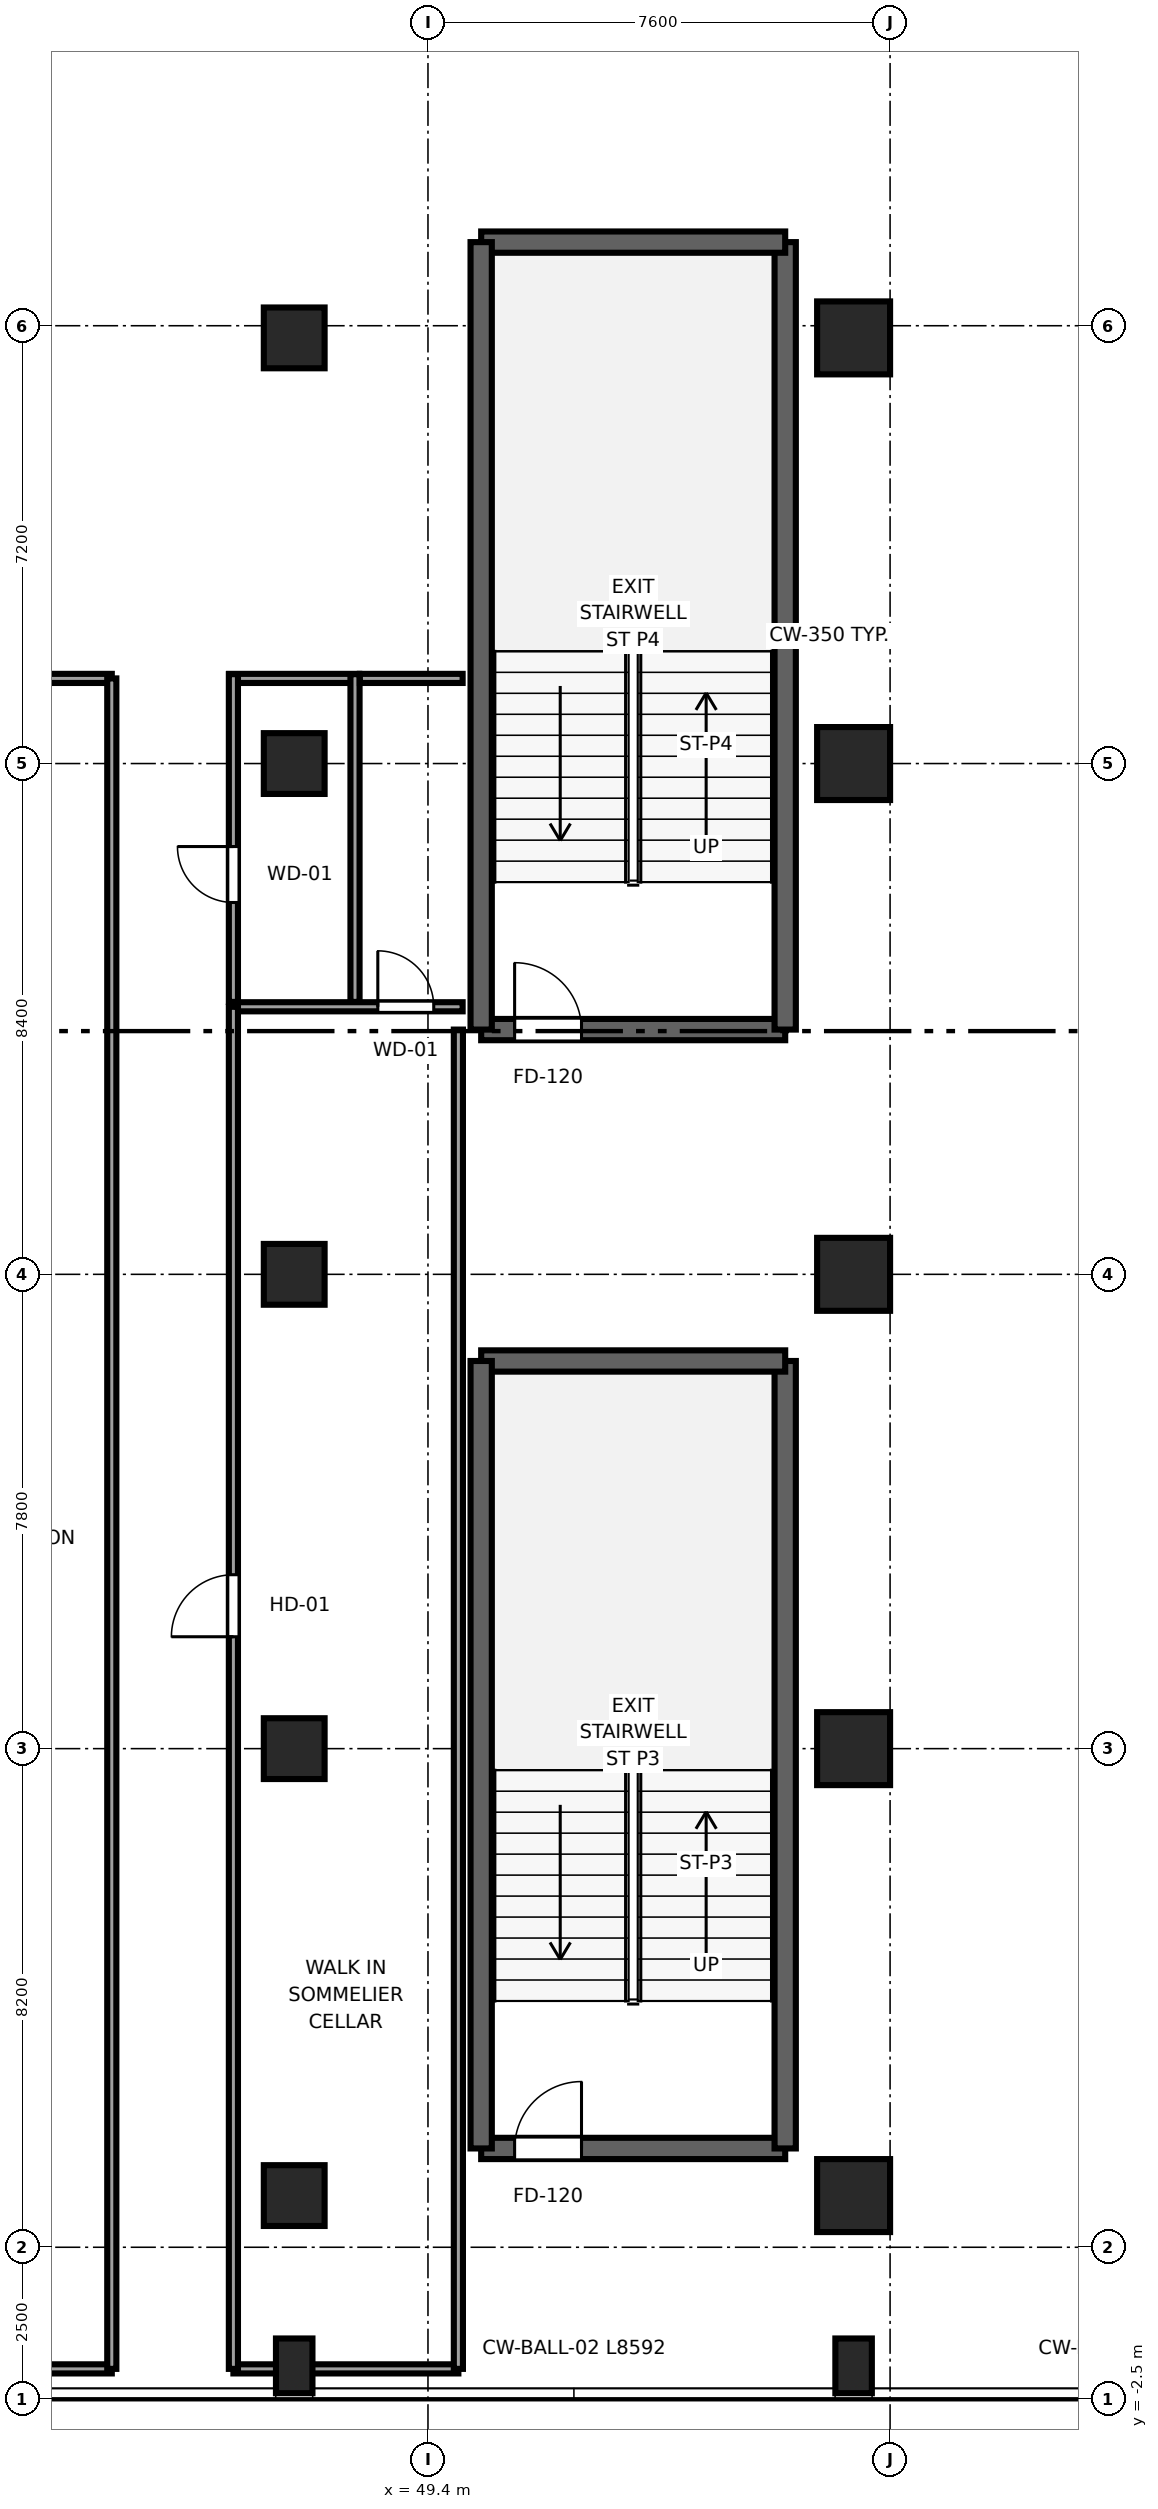
"""IFC4 building model, lengths in metres.
Left out: names, types, materials, properties, quantities, classifications, styles, units other than length and angle.
Written with IfcOpenShell. Run it as: python <this file> out.ifc"""

import sys

from ifc_helpers import new_model, si_unit, direction, frame, frame_2d, origin, origin_2d, place, context, subcontext, project, spatial, rectangle, extrude, source, transform, mapped, element, fill, save


model = new_model("IFC4")
c1 = context("Model", 3, precision=1e-05, world=origin(), true_north=direction((0.0, 1.0)))
c2 = subcontext(c1, "Body", "Model", "MODEL_VIEW")
j1 = project(units=[si_unit("LENGTHUNIT", "METRE"), si_unit("PLANEANGLEUNIT", "RADIAN")], contexts=[c1])
p1 = place(None, origin())
s1 = spatial("IfcSite", under=j1, at=p1, CompositionType="ELEMENT")
p2 = place(p1, origin())
s2 = spatial("IfcBuilding", under=s1, at=p2, CompositionType="ELEMENT")
p3 = place(p2, frame((0.0, 0.0, 22.4)))
s3 = spatial("IfcBuildingStorey", under=s2, at=p3, CompositionType="ELEMENT", Elevation=22.4)
p4 = place(p3, frame((50.275, 1.625, 0.0), z_axis=(0.0, 0.0, 1.0), x_axis=(1.0, 0.0, 0.0)))
e1 = element("IfcWall", 1, at=p4, inside=s3, PredefinedType="SHEAR", context=c2, shape_type="SweptSolid", body=[
    extrude(rectangle(XDim=5.0, YDim=0.35, at=frame_2d((2.5, 0.0))), origin(), (0.0, 0.0, 1.0), 4.4),
])
p5 = place(p4, frame((0.55, 0.0, 0.0)))
e2 = element("IfcOpeningElement", 2, at=p5, cuts=e1, PredefinedType="OPENING", context=c2, shape_type="SweptSolid", body=[
    extrude(rectangle(XDim=1.1, YDim=2.12, at=frame_2d((0.55, 1.06))), frame((0.0, 0.185, 0.0), z_axis=(0.0, -1.0, 0.0), x_axis=(1.0, 0.0, 0.0)), (0.0, 0.0, 1.0), 0.37),
])
p6 = place(p3, frame((55.275, 1.625, 0.0), z_axis=(0.0, 0.0, 1.0), x_axis=(0.0, 1.0, 0.0)))
e3 = element("IfcWall", 3, at=p6, inside=s3, PredefinedType="SHEAR", context=c2, shape_type="SweptSolid", body=[
    extrude(rectangle(XDim=12.95, YDim=0.35, at=frame_2d((6.475, 0.0))), origin(), (0.0, 0.0, 1.0), 4.4),
])
p7 = place(p3, frame((55.275, 14.575, 0.0), z_axis=(0.0, 0.0, 1.0), x_axis=(-1.0, 0.0, 0.0)))
e4 = element("IfcWall", 4, at=p7, inside=s3, PredefinedType="SHEAR", context=c2, shape_type="SweptSolid", body=[
    extrude(rectangle(XDim=5.0, YDim=0.35, at=frame_2d((2.5, 0.0))), origin(), (0.0, 0.0, 1.0), 4.4),
])
p8 = place(p3, frame((50.275, 14.575, 0.0), z_axis=(0.0, 0.0, 1.0), x_axis=(0.0, -1.0, 0.0)))
e5 = element("IfcWall", 5, at=p8, inside=s3, PredefinedType="SHEAR", context=c2, shape_type="SweptSolid", body=[
    extrude(rectangle(XDim=12.95, YDim=0.35, at=frame_2d((6.475, 0.0))), origin(), (0.0, 0.0, 1.0), 4.4),
])
p9 = place(p3, frame((50.275, 20.025, 0.0), z_axis=(0.0, 0.0, 1.0), x_axis=(1.0, 0.0, 0.0)))
e6 = element("IfcWall", 6, at=p9, inside=s3, PredefinedType="SHEAR", context=c2, shape_type="SweptSolid", body=[
    extrude(rectangle(XDim=5.0, YDim=0.35, at=frame_2d((2.5, 0.0))), origin(), (0.0, 0.0, 1.0), 4.4),
])
p10 = place(p9, frame((0.55, 0.0, 0.0)))
e7 = element("IfcOpeningElement", 7, at=p10, cuts=e6, PredefinedType="OPENING", context=c2, shape_type="SweptSolid", body=[
    extrude(rectangle(XDim=1.1, YDim=2.12, at=frame_2d((0.55, 1.06))), frame((0.0, 0.185, 0.0), z_axis=(0.0, -1.0, 0.0), x_axis=(1.0, 0.0, 0.0)), (0.0, 0.0, 1.0), 0.37),
])
p11 = place(p3, frame((55.275, 20.025, 0.0), z_axis=(0.0, 0.0, 1.0), x_axis=(0.0, 1.0, 0.0)))
e8 = element("IfcWall", 8, at=p11, inside=s3, PredefinedType="SHEAR", context=c2, shape_type="SweptSolid", body=[
    extrude(rectangle(XDim=12.95, YDim=0.35, at=frame_2d((6.475, 0.0))), origin(), (0.0, 0.0, 1.0), 4.4),
])
p12 = place(p3, frame((55.275, 32.975, 0.0), z_axis=(0.0, 0.0, 1.0), x_axis=(-1.0, 0.0, 0.0)))
e9 = element("IfcWall", 9, at=p12, inside=s3, PredefinedType="SHEAR", context=c2, shape_type="SweptSolid", body=[
    extrude(rectangle(XDim=5.0, YDim=0.35, at=frame_2d((2.5, 0.0))), origin(), (0.0, 0.0, 1.0), 4.4),
])
p13 = place(p3, frame((50.275, 32.975, 0.0), z_axis=(0.0, 0.0, 1.0), x_axis=(0.0, -1.0, 0.0)))
e10 = element("IfcWall", 10, at=p13, inside=s3, PredefinedType="SHEAR", context=c2, shape_type="SweptSolid", body=[
    extrude(rectangle(XDim=12.95, YDim=0.35, at=frame_2d((6.475, 0.0))), origin(), (0.0, 0.0, 1.0), 4.4),
])
m1 = source(origin(), c2, "Body", "SweptSolid", [
    extrude(rectangle(XDim=1.0, YDim=1.0, at=origin_2d()), origin(), (0.0, 0.0, 1.0), 4.4),
])
p14 = place(p3, frame((47.2, 0.85, 0.0), z_axis=(0.0, 0.0, 1.0), x_axis=(1.0, 0.0, 0.0)))
e11 = element("IfcColumn", 11, at=p14, inside=s3, PredefinedType="COLUMN", context=c2, shape_type="MappedRepresentation", body=[
    mapped(m1, transform((0.0, 0.0, 0.0), x_axis=(1.0, 0.0, 0.0), y_axis=(0.0, 1.0, 0.0), z_axis=(0.0, 0.0, 1.0), scale=1.0)),
])
m2 = source(origin(), c2, "Body", "SweptSolid", [
    extrude(rectangle(XDim=1.2, YDim=1.2, at=origin_2d()), origin(), (0.0, 0.0, 1.0), 4.4),
])
p15 = place(p3, frame((56.4, 0.85, 0.0), z_axis=(0.0, 0.0, 1.0), x_axis=(1.0, 0.0, 0.0)))
e12 = element("IfcColumn", 12, at=p15, inside=s3, PredefinedType="COLUMN", context=c2, shape_type="MappedRepresentation", body=[
    mapped(m2, transform((0.0, 0.0, 0.0), x_axis=(1.0, 0.0, 0.0), y_axis=(0.0, 1.0, 0.0), z_axis=(0.0, 0.0, 1.0), scale=1.0)),
])
p16 = place(p3, frame((47.2, 8.2, 0.0), z_axis=(0.0, 0.0, 1.0), x_axis=(1.0, 0.0, 0.0)))
e13 = element("IfcColumn", 13, at=p16, inside=s3, PredefinedType="COLUMN", context=c2, shape_type="MappedRepresentation", body=[
    mapped(m1, transform((0.0, 0.0, 0.0), x_axis=(1.0, 0.0, 0.0), y_axis=(0.0, 1.0, 0.0), z_axis=(0.0, 0.0, 1.0), scale=1.0)),
])
p17 = place(p3, frame((56.4, 8.2, 0.0), z_axis=(0.0, 0.0, 1.0), x_axis=(1.0, 0.0, 0.0)))
e14 = element("IfcColumn", 14, at=p17, inside=s3, PredefinedType="COLUMN", context=c2, shape_type="MappedRepresentation", body=[
    mapped(m2, transform((0.0, 0.0, 0.0), x_axis=(1.0, 0.0, 0.0), y_axis=(0.0, 1.0, 0.0), z_axis=(0.0, 0.0, 1.0), scale=1.0)),
])
p18 = place(p3, frame((47.2, 16.0, 0.0), z_axis=(0.0, 0.0, 1.0), x_axis=(1.0, 0.0, 0.0)))
e15 = element("IfcColumn", 15, at=p18, inside=s3, PredefinedType="COLUMN", context=c2, shape_type="MappedRepresentation", body=[
    mapped(m1, transform((0.0, 0.0, 0.0), x_axis=(1.0, 0.0, 0.0), y_axis=(0.0, 1.0, 0.0), z_axis=(0.0, 0.0, 1.0), scale=1.0)),
])
p19 = place(p3, frame((56.4, 16.0, 0.0), z_axis=(0.0, 0.0, 1.0), x_axis=(1.0, 0.0, 0.0)))
e16 = element("IfcColumn", 16, at=p19, inside=s3, PredefinedType="COLUMN", context=c2, shape_type="MappedRepresentation", body=[
    mapped(m2, transform((0.0, 0.0, 0.0), x_axis=(1.0, 0.0, 0.0), y_axis=(0.0, 1.0, 0.0), z_axis=(0.0, 0.0, 1.0), scale=1.0)),
])
p20 = place(p3, frame((47.2, 24.4, 0.0), z_axis=(0.0, 0.0, 1.0), x_axis=(1.0, 0.0, 0.0)))
e17 = element("IfcColumn", 17, at=p20, inside=s3, PredefinedType="COLUMN", context=c2, shape_type="MappedRepresentation", body=[
    mapped(m1, transform((0.0, 0.0, 0.0), x_axis=(1.0, 0.0, 0.0), y_axis=(0.0, 1.0, 0.0), z_axis=(0.0, 0.0, 1.0), scale=1.0)),
])
p21 = place(p3, frame((56.4, 24.4, 0.0), z_axis=(0.0, 0.0, 1.0), x_axis=(1.0, 0.0, 0.0)))
e18 = element("IfcColumn", 18, at=p21, inside=s3, PredefinedType="COLUMN", context=c2, shape_type="MappedRepresentation", body=[
    mapped(m2, transform((0.0, 0.0, 0.0), x_axis=(1.0, 0.0, 0.0), y_axis=(0.0, 1.0, 0.0), z_axis=(0.0, 0.0, 1.0), scale=1.0)),
])
p22 = place(p3, frame((47.2, 31.4, 0.0), z_axis=(0.0, 0.0, 1.0), x_axis=(1.0, 0.0, 0.0)))
e19 = element("IfcColumn", 19, at=p22, inside=s3, PredefinedType="COLUMN", context=c2, shape_type="MappedRepresentation", body=[
    mapped(m1, transform((0.0, 0.0, 0.0), x_axis=(1.0, 0.0, 0.0), y_axis=(0.0, 1.0, 0.0), z_axis=(0.0, 0.0, 1.0), scale=1.0)),
])
p23 = place(p3, frame((56.4, 31.4, 0.0), z_axis=(0.0, 0.0, 1.0), x_axis=(1.0, 0.0, 0.0)))
e20 = element("IfcColumn", 20, at=p23, inside=s3, PredefinedType="COLUMN", context=c2, shape_type="MappedRepresentation", body=[
    mapped(m2, transform((0.0, 0.0, 0.0), x_axis=(1.0, 0.0, 0.0), y_axis=(0.0, 1.0, 0.0), z_axis=(0.0, 0.0, 1.0), scale=1.0)),
])
m3 = source(origin(), c2, "Body", "SweptSolid", [
    extrude(rectangle(XDim=0.6, YDim=0.9, at=origin_2d()), origin(), (0.0, 0.0, 1.0), 4.4),
])
for number, where, z_axis, x_axis in (
    (21, (47.2, -1.95, 0.0), (0.0, 0.0, 1.0), (1.0, 0.0, 0.0)),
    (22, (56.4, -1.95, 0.0), (0.0, 0.0, 1.0), (1.0, 0.0, 0.0)),
):
    element("IfcColumn", number, at=place(p3, frame(where, z_axis=z_axis, x_axis=x_axis)), inside=s3, PredefinedType="PILASTER", context=c2, shape_type="MappedRepresentation", body=[
        mapped(m3, transform((0.0, 0.0, 0.0), x_axis=(1.0, 0.0, 0.0), y_axis=(0.0, 1.0, 0.0), z_axis=(0.0, 0.0, 1.0), scale=1.0)),
    ])
p24 = place(p3, frame((39.1, -2.0, 0.0), z_axis=(0.0, 0.0, 1.0), x_axis=(1.0, 0.0, 0.0)))
e23 = element("IfcWall", 23, at=p24, inside=s3, PredefinedType="PARTITIONING", context=c2, shape_type="SweptSolid", body=[
    extrude(rectangle(XDim=5.1, YDim=0.15, at=frame_2d((2.55, 0.0))), origin(), (0.0, 0.0, 1.0), 3.43),
])
p25 = place(p3, frame((39.1, 25.8, 0.0), z_axis=(0.0, 0.0, 1.0), x_axis=(1.0, 0.0, 0.0)))
e24 = element("IfcWall", 24, at=p25, inside=s3, PredefinedType="PARTITIONING", context=c2, shape_type="SweptSolid", body=[
    extrude(rectangle(XDim=5.1, YDim=0.15, at=frame_2d((2.55, 0.0))), origin(), (0.0, 0.0, 1.0), 4.14),
])
p26 = place(p25, frame((1.725, 0.0, 0.0)))
e25 = element("IfcOpeningElement", 25, at=p26, cuts=e24, PredefinedType="OPENING", context=c2, shape_type="SweptSolid", body=[
    extrude(rectangle(XDim=1.65, YDim=2.15, at=frame_2d((0.825, 1.075))), frame((0.0, 0.085, 0.0), z_axis=(0.0, -1.0, 0.0), x_axis=(1.0, 0.0, 0.0)), (0.0, 0.0, 1.0), 0.17),
])
p27 = place(p3, frame((44.2, -2.0, 0.0), z_axis=(0.0, 0.0, 1.0), x_axis=(0.0, 1.0, 0.0)))
e26 = element("IfcWall", 26, at=p27, inside=s3, PredefinedType="PARTITIONING", context=c2, shape_type="SweptSolid", body=[
    extrude(rectangle(XDim=27.8, YDim=0.15, at=frame_2d((13.9, 0.0))), origin(), (0.0, 0.0, 1.0), 3.676),
])
p28 = place(p3, frame((46.2, -2.0, 0.0), z_axis=(0.0, 0.0, 1.0), x_axis=(1.0, 0.0, 0.0)))
e27 = element("IfcWall", 27, at=p28, inside=s3, PredefinedType="PARTITIONING", context=c2, shape_type="SweptSolid", body=[
    extrude(rectangle(XDim=3.7, YDim=0.15, at=frame_2d((1.85, 0.0))), origin(), (0.0, 0.0, 1.0), 3.43),
])
p29 = place(p3, frame((46.13, 20.4, 0.0), z_axis=(0.0, 0.0, 1.0), x_axis=(1.0, 0.0, 0.0)))
e28 = element("IfcWall", 28, at=p29, inside=s3, PredefinedType="PARTITIONING", context=c2, shape_type="SweptSolid", body=[
    extrude(rectangle(XDim=3.84, YDim=0.15, at=frame_2d((1.92, 0.0))), origin(), (0.0, 0.0, 1.0), 4.14),
])
p30 = place(p29, frame((2.445, 0.0, 0.0)))
e29 = element("IfcOpeningElement", 29, at=p30, cuts=e28, PredefinedType="OPENING", context=c2, shape_type="SweptSolid", body=[
    extrude(rectangle(XDim=0.92, YDim=2.01, at=frame_2d((0.46, 1.005))), frame((0.0, 0.085, 0.0), z_axis=(0.0, -1.0, 0.0), x_axis=(1.0, 0.0, 0.0)), (0.0, 0.0, 1.0), 0.17),
])
p31 = place(p3, frame((46.2, -2.0, 0.0), z_axis=(0.0, 0.0, 1.0), x_axis=(0.0, 1.0, 0.0)))
e30 = element("IfcWall", 30, at=p31, inside=s3, PredefinedType="PARTITIONING", context=c2, shape_type="SweptSolid", body=[
    extrude(rectangle(XDim=22.4, YDim=0.15, at=frame_2d((11.2, 0.0))), origin(), (0.0, 0.0, 1.0), 4.14),
])
p32 = place(p31, frame((12.04, 0.0, 0.0)))
e31 = element("IfcOpeningElement", 31, at=p32, cuts=e30, PredefinedType="OPENING", context=c2, shape_type="SweptSolid", body=[
    extrude(rectangle(XDim=1.02, YDim=2.03, at=frame_2d((0.51, 1.015))), frame((0.0, 0.085, 0.0), z_axis=(0.0, -1.0, 0.0), x_axis=(1.0, 0.0, 0.0)), (0.0, 0.0, 1.0), 0.17),
])
p33 = place(p3, frame((49.9, -2.0, 0.0), z_axis=(0.0, 0.0, 1.0), x_axis=(0.0, 1.0, 0.0)))
e32 = element("IfcWall", 32, at=p33, inside=s3, PredefinedType="PARTITIONING", context=c2, shape_type="SweptSolid", body=[
    extrude(rectangle(XDim=22.025, YDim=0.15, at=frame_2d((11.012, 0.0))), origin(), (0.0, 0.0, 1.0), 4.14),
])
p34 = place(p3, frame((46.13, 25.8, 0.0), z_axis=(0.0, 0.0, 1.0), x_axis=(1.0, 0.0, 0.0)))
e33 = element("IfcWall", 33, at=p34, inside=s3, PredefinedType="PARTITIONING", context=c2, shape_type="SweptSolid", body=[
    extrude(rectangle(XDim=2.14, YDim=0.15, at=frame_2d((1.07, 0.0))), origin(), (0.0, 0.0, 1.0), 4.14),
])
p35 = place(p3, frame((46.2, 20.48, 0.0), z_axis=(0.0, 0.0, 1.0), x_axis=(0.0, 1.0, 0.0)))
e34 = element("IfcWall", 34, at=p35, inside=s3, PredefinedType="PARTITIONING", context=c2, shape_type="SweptSolid", body=[
    extrude(rectangle(XDim=5.39, YDim=0.15, at=frame_2d((2.695, 0.0))), origin(), (0.0, 0.0, 1.0), 4.14),
])
p36 = place(p35, frame((1.635, 0.0, 0.0)))
e35 = element("IfcOpeningElement", 35, at=p36, cuts=e34, PredefinedType="OPENING", context=c2, shape_type="SweptSolid", body=[
    extrude(rectangle(XDim=0.92, YDim=2.01, at=frame_2d((0.46, 1.005))), frame((0.0, 0.085, 0.0), z_axis=(0.0, -1.0, 0.0), x_axis=(1.0, 0.0, 0.0)), (0.0, 0.0, 1.0), 0.17),
])
p37 = place(p3, frame((48.2, 20.48, 0.0), z_axis=(0.0, 0.0, 1.0), x_axis=(0.0, 1.0, 0.0)))
e36 = element("IfcWall", 36, at=p37, inside=s3, PredefinedType="PARTITIONING", context=c2, shape_type="SweptSolid", body=[
    extrude(rectangle(XDim=5.39, YDim=0.15, at=frame_2d((2.695, 0.0))), origin(), (0.0, 0.0, 1.0), 4.14),
])
p38 = place(p3, frame((48.28, 25.8, 0.0), z_axis=(0.0, 0.0, 1.0), x_axis=(1.0, 0.0, 0.0)))
e37 = element("IfcWall", 37, at=p38, inside=s3, PredefinedType="PARTITIONING", context=c2, shape_type="SweptSolid", body=[
    extrude(rectangle(XDim=1.69, YDim=0.15, at=frame_2d((0.845, 0.0))), origin(), (0.0, 0.0, 1.0), 4.14),
])
m4 = source(origin(), c2, "Body", "SweptSolid", [
    extrude(rectangle(XDim=1.1, YDim=2.12, at=frame_2d((0.55, 1.06))), frame((0.0, 0.025, 0.0), z_axis=(0.0, -1.0, 0.0), x_axis=(1.0, 0.0, 0.0)), (0.0, 0.0, 1.0), 0.05),
])
p39 = place(p5, origin())
e38 = element("IfcDoor", 38, at=p39, inside=s3, OperationType="SINGLE_SWING_RIGHT", PredefinedType="DOOR", context=c2, shape_type="MappedRepresentation", body=[
    mapped(m4, transform((0.0, 0.0, 0.0), x_axis=(1.0, 0.0, 0.0), y_axis=(0.0, 1.0, 0.0), z_axis=(0.0, 0.0, 1.0), scale=1.0)),
])
fill(e2, e38)
p40 = place(p10, origin())
e39 = element("IfcDoor", 39, at=p40, inside=s3, OperationType="SINGLE_SWING_LEFT", PredefinedType="DOOR", context=c2, shape_type="MappedRepresentation", body=[
    mapped(m4, transform((0.0, 0.0, 0.0), x_axis=(1.0, 0.0, 0.0), y_axis=(0.0, 1.0, 0.0), z_axis=(0.0, 0.0, 1.0), scale=1.0)),
])
fill(e7, e39)
m5 = source(origin(), c2, "Body", "SweptSolid", [
    extrude(rectangle(XDim=1.02, YDim=2.03, at=frame_2d((0.51, 1.015))), frame((0.0, 0.025, 0.0), z_axis=(0.0, -1.0, 0.0), x_axis=(1.0, 0.0, 0.0)), (0.0, 0.0, 1.0), 0.05),
])
p41 = place(p32, origin())
e40 = element("IfcDoor", 40, at=p41, inside=s3, OperationType="SINGLE_SWING_LEFT", PredefinedType="DOOR", context=c2, shape_type="MappedRepresentation", body=[
    mapped(m5, transform((0.0, 0.0, 0.0), x_axis=(1.0, 0.0, 0.0), y_axis=(0.0, 1.0, 0.0), z_axis=(0.0, 0.0, 1.0), scale=1.0)),
])
fill(e31, e40)
m6 = source(origin(), c2, "Body", "SweptSolid", [
    extrude(rectangle(XDim=0.92, YDim=2.01, at=frame_2d((0.46, 1.005))), frame((0.0, 0.025, 0.0), z_axis=(0.0, -1.0, 0.0), x_axis=(1.0, 0.0, 0.0)), (0.0, 0.0, 1.0), 0.05),
])
p42 = place(p36, origin())
e41 = element("IfcDoor", 41, at=p42, inside=s3, OperationType="SINGLE_SWING_RIGHT", PredefinedType="DOOR", context=c2, shape_type="MappedRepresentation", body=[
    mapped(m6, transform((0.0, 0.0, 0.0), x_axis=(1.0, 0.0, 0.0), y_axis=(0.0, 1.0, 0.0), z_axis=(0.0, 0.0, 1.0), scale=1.0)),
])
fill(e35, e41)
p43 = place(p30, origin())
e42 = element("IfcDoor", 42, at=p43, inside=s3, OperationType="SINGLE_SWING_LEFT", PredefinedType="DOOR", context=c2, shape_type="MappedRepresentation", body=[
    mapped(m6, transform((0.0, 0.0, 0.0), x_axis=(1.0, 0.0, 0.0), y_axis=(0.0, 1.0, 0.0), z_axis=(0.0, 0.0, 1.0), scale=1.0)),
])
fill(e29, e42)
save(model, sys.argv[1])
